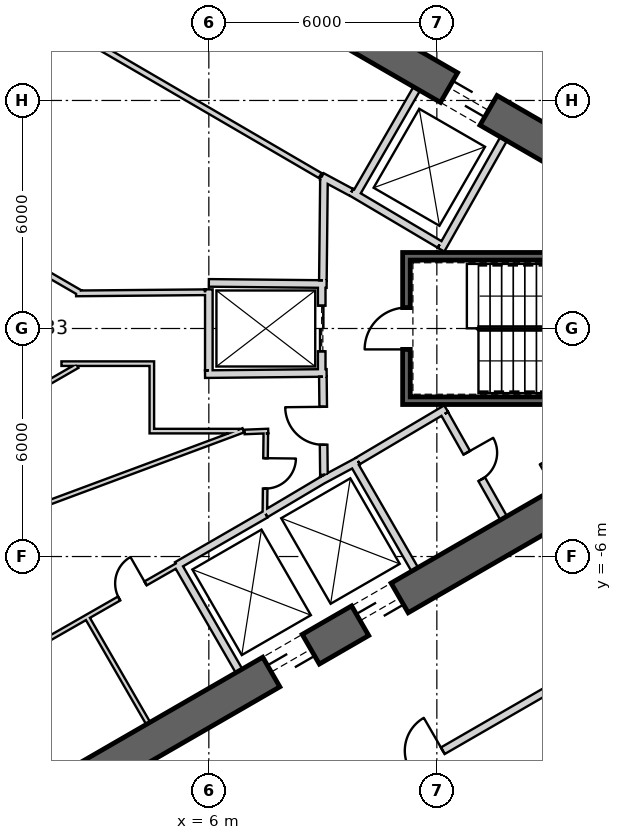
"""IFC4 building model, lengths in metres.
Left out: names, types, materials, properties, quantities, classifications, styles, units other than length and angle.
Written with IfcOpenShell. Run it as: python <this file> out.ifc"""

import sys

from ifc_helpers import new_model, si_unit, direction, frame, frame_2d, origin, place, context, subcontext, project, spatial, rectangle, extrude, element, fill, save


model = new_model("IFC4")
c1 = context("Model", 3, precision=1e-05, world=origin(), true_north=direction((0.0, 1.0)))
c2 = subcontext(c1, "Body", "Model", "MODEL_VIEW")
j1 = project(units=[si_unit("LENGTHUNIT", "METRE"), si_unit("PLANEANGLEUNIT", "RADIAN")], contexts=[c1])
p1 = place(None, origin())
s1 = spatial("IfcSite", under=j1, at=p1, CompositionType="ELEMENT")
p2 = place(p1, origin())
s2 = spatial("IfcBuilding", under=s1, at=p2, CompositionType="ELEMENT")
p3 = place(p2, frame((0.0, 0.0, 298.7)))
s3 = spatial("IfcBuildingStorey", under=s2, at=p3, CompositionType="ELEMENT", Elevation=298.7)
p4 = place(p3, frame((19.475, 2.208, 0.0), z_axis=(0.0, 0.0, 1.0), x_axis=(-0.866028369851, 0.499994862586, 0.0)))
e1 = element("IfcWall", 1, at=p4, inside=s3, PredefinedType="SHEAR", context=c2, shape_type="SweptSolid", body=[
    extrude(rectangle(XDim=31.523, YDim=0.9, at=frame_2d((15.762, 0.0))), origin(), (0.0, 0.0, 1.0), 3.9),
])
p5 = place(p4, frame((7.062, 0.0, 0.0)))
e2 = element("IfcOpeningElement", 2, at=p5, cuts=e1, PredefinedType="OPENING", context=c2, shape_type="SweptSolid", body=[
    extrude(rectangle(XDim=1.2, YDim=2.4, at=frame_2d((0.6, 1.2))), frame((0.0, 0.46, 0.0), z_axis=(0.0, -1.0, 0.0), x_axis=(1.0, 0.0, 0.0)), (0.0, 0.0, 1.0), 0.92),
])
p6 = place(p4, frame((3.612, 0.0, 0.0)))
e3 = element("IfcOpeningElement", 3, at=p6, cuts=e1, PredefinedType="OPENING", context=c2, shape_type="SweptSolid", body=[
    extrude(rectangle(XDim=1.2, YDim=2.4, at=frame_2d((0.6, 1.2))), frame((0.0, 0.46, 0.0), z_axis=(0.0, -1.0, 0.0), x_axis=(1.0, 0.0, 0.0)), (0.0, 0.0, 1.0), 0.92),
])
p7 = place(p4, frame((26.712, 0.0, 0.0)))
e4 = element("IfcOpeningElement", 4, at=p7, cuts=e1, PredefinedType="OPENING", context=c2, shape_type="SweptSolid", body=[
    extrude(rectangle(XDim=1.2, YDim=2.4, at=frame_2d((0.6, 1.2))), frame((0.0, 0.46, 0.0), z_axis=(0.0, -1.0, 0.0), x_axis=(1.0, 0.0, 0.0)), (0.0, 0.0, 1.0), 0.92),
])
p8 = place(p3, frame((-7.825, -17.97, 0.0), z_axis=(0.0, 0.0, 1.0), x_axis=(0.866028369851, 0.499994862586, 0.0)))
e5 = element("IfcWall", 5, at=p8, inside=s3, PredefinedType="SHEAR", context=c2, shape_type="SweptSolid", body=[
    extrude(rectangle(XDim=31.523, YDim=0.9, at=frame_2d((15.762, 0.0))), origin(), (0.0, 0.0, 1.0), 3.9),
])
p9 = place(p8, frame((17.862, 0.0, 0.0)))
e6 = element("IfcOpeningElement", 6, at=p9, cuts=e5, PredefinedType="OPENING", context=c2, shape_type="SweptSolid", body=[
    extrude(rectangle(XDim=1.2, YDim=2.4, at=frame_2d((0.6, 1.2))), frame((0.0, 0.46, 0.0), z_axis=(0.0, -1.0, 0.0), x_axis=(1.0, 0.0, 0.0)), (0.0, 0.0, 1.0), 0.92),
])
p10 = place(p8, frame((20.562, 0.0, 0.0)))
e7 = element("IfcOpeningElement", 7, at=p10, cuts=e5, PredefinedType="OPENING", context=c2, shape_type="SweptSolid", body=[
    extrude(rectangle(XDim=1.2, YDim=2.4, at=frame_2d((0.6, 1.2))), frame((0.0, 0.46, 0.0), z_axis=(0.0, -1.0, 0.0), x_axis=(1.0, 0.0, 0.0)), (0.0, 0.0, 1.0), 0.92),
])
p11 = place(p8, frame((26.712, 0.0, 0.0)))
e8 = element("IfcOpeningElement", 8, at=p11, cuts=e5, PredefinedType="OPENING", context=c2, shape_type="SweptSolid", body=[
    extrude(rectangle(XDim=1.2, YDim=2.4, at=frame_2d((0.6, 1.2))), frame((0.0, 0.46, 0.0), z_axis=(0.0, -1.0, 0.0), x_axis=(1.0, 0.0, 0.0)), (0.0, 0.0, 1.0), 0.92),
])
p12 = place(p8, frame((3.612, 0.0, 0.0)))
e9 = element("IfcOpeningElement", 9, at=p12, cuts=e5, PredefinedType="OPENING", context=c2, shape_type="SweptSolid", body=[
    extrude(rectangle(XDim=1.2, YDim=2.4, at=frame_2d((0.6, 1.2))), frame((0.0, 0.46, 0.0), z_axis=(0.0, -1.0, 0.0), x_axis=(1.0, 0.0, 0.0)), (0.0, 0.0, 1.0), 0.92),
])
p13 = place(p3, frame((9.847, 3.495, 0.0), z_axis=(0.0, 0.0, 1.0), x_axis=(0.499984717929, 0.866034226713, 0.0)))
e10 = element("IfcWall", 10, at=p13, inside=s3, PredefinedType="PLUMBINGWALL", context=c2, shape_type="SweptSolid", body=[
    extrude(rectangle(XDim=3.25, YDim=0.2, at=frame_2d((1.625, 0.0))), origin(), (0.0, 0.0, 1.0), 3.6),
])
p14 = place(p3, frame((12.11, 2.073, 0.0), z_axis=(0.0, 0.0, 1.0), x_axis=(0.49196600604, 0.870614408852, 0.0)))
e11 = element("IfcWall", 11, at=p14, inside=s3, PredefinedType="PLUMBINGWALL", context=c2, shape_type="SweptSolid", body=[
    extrude(rectangle(XDim=3.35, YDim=0.2, at=frame_2d((1.675, 0.0))), origin(), (0.0, 0.0, 1.0), 3.6),
])
p15 = place(p3, frame((12.073, 2.211, 0.0), z_axis=(0.0, 0.0, 1.0), x_axis=(-0.860414880418, 0.509594185166, 0.0)))
e12 = element("IfcWall", 12, at=p15, inside=s3, PredefinedType="PLUMBINGWALL", context=c2, shape_type="SweptSolid", body=[
    extrude(rectangle(XDim=2.7, YDim=0.2, at=frame_2d((1.35, 0.0))), origin(), (0.0, 0.0, 1.0), 3.6),
])
p16 = place(p3, frame((6.795, -9.01, 0.0), z_axis=(0.0, 0.0, 1.0), x_axis=(-0.499984717929, 0.866034226713, 0.0)))
e13 = element("IfcWall", 13, at=p16, inside=s3, PredefinedType="PLUMBINGWALL", context=c2, shape_type="SweptSolid", body=[
    extrude(rectangle(XDim=3.25, YDim=0.2, at=frame_2d((1.625, 0.0))), origin(), (0.0, 0.0, 1.0), 3.6),
])
p17 = place(p3, frame((5.159, -6.236, 0.0), z_axis=(0.0, 0.0, 1.0), x_axis=(0.866036505625, 0.499980770555, 0.0)))
e14 = element("IfcWall", 14, at=p17, inside=s3, PredefinedType="PLUMBINGWALL", context=c2, shape_type="SweptSolid", body=[
    extrude(rectangle(XDim=2.7, YDim=0.2, at=frame_2d((1.35, 0.0))), origin(), (0.0, 0.0, 1.0), 3.6),
])
p18 = place(p3, frame((9.795, -3.525, 0.0), z_axis=(0.0, 0.0, 1.0), x_axis=(0.499984717929, -0.866034226713, 0.0)))
e15 = element("IfcWall", 15, at=p18, inside=s3, PredefinedType="PLUMBINGWALL", context=c2, shape_type="SweptSolid", body=[
    extrude(rectangle(XDim=3.25, YDim=0.2, at=frame_2d((1.625, 0.0))), origin(), (0.0, 0.0, 1.0), 3.6),
])
p19 = place(p3, frame((8.974, -3.999, 0.0), z_axis=(0.0, 0.0, 1.0), x_axis=(0.880907015104, 0.473289373154, 0.0)))
e16 = element("IfcWall", 16, at=p19, inside=s3, PredefinedType="PLUMBINGWALL", context=c2, shape_type="SweptSolid", body=[
    extrude(rectangle(XDim=1.078, YDim=0.2, at=frame_2d((0.539, 0.0))), origin(), (0.0, 0.0, 1.0), 3.6),
])
p20 = place(p3, frame((7.493, -4.878, 0.0), z_axis=(0.0, 0.0, 1.0), x_axis=(0.859981807212, 0.510324691999, 0.0)))
e17 = element("IfcWall", 17, at=p20, inside=s3, PredefinedType="PLUMBINGWALL", context=c2, shape_type="SweptSolid", body=[
    extrude(rectangle(XDim=1.845, YDim=0.2, at=frame_2d((0.922, 0.0))), origin(), (0.0, 0.0, 1.0), 3.6),
])
p21 = place(p3, frame((19.2, 1.9, -0.3), z_axis=(0.0, 0.0, 1.0), x_axis=(-1.0, 0.0, 0.0)))
e18 = element("IfcWall", 18, at=p21, inside=s3, PredefinedType="SHEAR", context=c2, shape_type="SweptSolid", body=[
    extrude(rectangle(XDim=8.1, YDim=0.2, at=frame_2d((4.05, 0.0))), origin(), (0.0, 0.0, 1.0), 3.9),
])
p22 = place(p3, frame((11.1, -1.9, -0.3), z_axis=(0.0, 0.0, 1.0), x_axis=(1.0, 0.0, 0.0)))
e19 = element("IfcWall", 19, at=p22, inside=s3, PredefinedType="SHEAR", context=c2, shape_type="SweptSolid", body=[
    extrude(rectangle(XDim=7.9, YDim=0.2, at=frame_2d((3.95, 0.0))), origin(), (0.0, 0.0, 1.0), 3.9),
])
p23 = place(p3, frame((11.2, -1.8, -0.3), z_axis=(0.0, 0.0, 1.0), x_axis=(0.0, 1.0, 0.0)))
e20 = element("IfcWall", 20, at=p23, inside=s3, PredefinedType="SHEAR", context=c2, shape_type="SweptSolid", body=[
    extrude(rectangle(XDim=3.6, YDim=0.2, at=frame_2d((1.8, 0.0))), origin(), (0.0, 0.0, 1.0), 3.9),
])
p24 = place(p23, frame((1.25, 0.0, 0.3)))
e21 = element("IfcOpeningElement", 21, at=p24, cuts=e20, PredefinedType="OPENING", context=c2, shape_type="SweptSolid", body=[
    extrude(rectangle(XDim=1.1, YDim=2.1, at=frame_2d((0.55, 1.05))), frame((0.0, 0.11, 0.0), z_axis=(0.0, -1.0, 0.0), x_axis=(1.0, 0.0, 0.0)), (0.0, 0.0, 1.0), 0.22),
])
p25 = place(p3, frame((8.97, 1.2, 0.0), z_axis=(0.0, 0.0, 1.0), x_axis=(0.0, -1.0, 0.0)))
e22 = element("IfcWall", 22, at=p25, inside=s3, PredefinedType="PLUMBINGWALL", context=c2, shape_type="SweptSolid", body=[
    extrude(rectangle(XDim=2.4, YDim=0.2, at=frame_2d((1.2, 0.0))), origin(), (0.0, 0.0, 1.0), 3.6),
])
p26 = place(p25, frame((0.6, 0.0, 0.0)))
e23 = element("IfcOpeningElement", 23, at=p26, cuts=e22, PredefinedType="OPENING", context=c2, shape_type="SweptSolid", body=[
    extrude(rectangle(XDim=1.2, YDim=2.4, at=frame_2d((0.6, 1.2))), frame((0.0, 0.11, 0.0), z_axis=(0.0, -1.0, 0.0), x_axis=(1.0, 0.0, 0.0)), (0.0, 0.0, 1.0), 0.22),
])
p27 = place(p3, frame((6.0, 1.2, 0.0), z_axis=(0.0, 0.0, 1.0), x_axis=(0.999949988, -0.010001074852, 0.0)))
e24 = element("IfcWall", 24, at=p27, inside=s3, PredefinedType="PLUMBINGWALL", context=c2, shape_type="SweptSolid", body=[
    extrude(rectangle(XDim=3.1, YDim=0.2, at=frame_2d((1.55, 0.0))), origin(), (0.0, 0.0, 1.0), 3.6),
])
p28 = place(p3, frame((5.9, -1.201, 0.0), z_axis=(0.0, 0.0, 1.0), x_axis=(0.999950064753, 0.009993397809, 0.0)))
e25 = element("IfcWall", 25, at=p28, inside=s3, PredefinedType="PLUMBINGWALL", context=c2, shape_type="SweptSolid", body=[
    extrude(rectangle(XDim=3.2, YDim=0.2, at=frame_2d((1.6, 0.0))), origin(), (0.0, 0.0, 1.0), 3.6),
])
p29 = place(p3, frame((6.0, -1.1, 0.0), z_axis=(0.0, 0.0, 1.0), x_axis=(0.0, 1.0, 0.0)))
e26 = element("IfcWall", 26, at=p29, inside=s3, PredefinedType="PLUMBINGWALL", context=c2, shape_type="SweptSolid", body=[
    extrude(rectangle(XDim=2.13, YDim=0.2, at=frame_2d((1.065, 0.0))), origin(), (0.0, 0.0, 1.0), 3.6),
])
p30 = place(p3, frame((8.974, 3.999, 0.0), z_axis=(0.0, 0.0, 1.0), x_axis=(0.880917147855, -0.473270513147, 0.0)))
e27 = element("IfcWall", 27, at=p30, inside=s3, PredefinedType="PARTITIONING", context=c2, shape_type="SweptSolid", body=[
    extrude(rectangle(XDim=0.878, YDim=0.2, at=frame_2d((0.439, 0.0))), origin(), (0.0, 0.0, 1.0), 3.6),
])
p31 = place(p3, frame((8.931, 4.024, 0.0), z_axis=(0.0, 0.0, 1.0), x_axis=(-0.863936620311, 0.50360055211, 0.0)))
e28 = element("IfcWall", 28, at=p31, inside=s3, PredefinedType="PLUMBINGWALL", context=c2, shape_type="SweptSolid", body=[
    extrude(rectangle(XDim=7.072, YDim=0.15, at=frame_2d((3.536, 0.0))), origin(), (0.0, 0.0, 1.0), 3.6),
])
p32 = place(p3, frame((4.405, -10.389, 0.0), z_axis=(0.0, 0.0, 1.0), x_axis=(-0.500017246033, 0.866015446554, 0.0)))
e29 = element("IfcWall", 29, at=p32, inside=s3, PredefinedType="PARTITIONING", context=c2, shape_type="SweptSolid", body=[
    extrude(rectangle(XDim=3.25, YDim=0.12, at=frame_2d((1.625, 0.0))), origin(), (0.0, 0.0, 1.0), 3.6),
])
p33 = place(p3, frame((-1.024, -9.771, 0.0), z_axis=(0.0, 0.0, 1.0), x_axis=(0.868110220015, 0.496371479746, 0.0)))
e30 = element("IfcWall", 30, at=p33, inside=s3, PredefinedType="PARTITIONING", context=c2, shape_type="SweptSolid", body=[
    extrude(rectangle(XDim=7.123, YDim=0.12, at=frame_2d((3.561, 0.0))), origin(), (0.0, 0.0, 1.0), 3.6),
])
p34 = place(p33, frame((5.373, 0.0, 0.0)))
e31 = element("IfcOpeningElement", 31, at=p34, cuts=e30, PredefinedType="OPENING", context=c2, shape_type="SweptSolid", body=[
    extrude(rectangle(XDim=0.8, YDim=2.1, at=frame_2d((0.4, 1.05))), frame((0.0, 0.07, 0.0), z_axis=(0.0, -1.0, 0.0), x_axis=(1.0, 0.0, 0.0)), (0.0, 0.0, 1.0), 0.14),
])
p35 = place(p3, frame((12.245, -2.109, 0.0), z_axis=(0.0, 0.0, 1.0), x_axis=(-0.860414880418, -0.509594185166, 0.0)))
e32 = element("IfcWall", 32, at=p35, inside=s3, PredefinedType="PARTITIONING", context=c2, shape_type="SweptSolid", body=[
    extrude(rectangle(XDim=2.7, YDim=0.2, at=frame_2d((1.35, 0.0))), origin(), (0.0, 0.0, 1.0), 3.6),
])
p36 = place(p3, frame((13.758, -4.99, 0.0), z_axis=(0.0, 0.0, 1.0), x_axis=(-0.491993409184, 0.87059892334, 0.0)))
e33 = element("IfcWall", 33, at=p36, inside=s3, PredefinedType="PARTITIONING", context=c2, shape_type="SweptSolid", body=[
    extrude(rectangle(XDim=3.15, YDim=0.2, at=frame_2d((1.575, 0.0))), origin(), (0.0, 0.0, 1.0), 3.6),
])
p37 = place(p36, frame((1.175, 0.0, 0.0)))
e34 = element("IfcOpeningElement", 34, at=p37, cuts=e33, PredefinedType="OPENING", context=c2, shape_type="SweptSolid", body=[
    extrude(rectangle(XDim=0.8, YDim=2.1, at=frame_2d((0.4, 1.05))), frame((0.0, 0.11, 0.0), z_axis=(0.0, -1.0, 0.0), x_axis=(1.0, 0.0, 0.0)), (0.0, 0.0, 1.0), 0.22),
])
p38 = place(p3, frame((9.001, 1.27, 0.0), z_axis=(0.0, 0.0, 1.0), x_axis=(0.010747252091, 0.999942246619, 0.0)))
e35 = element("IfcWall", 35, at=p38, inside=s3, PredefinedType="PARTITIONING", context=c2, shape_type="SweptSolid", body=[
    extrude(rectangle(XDim=2.726, YDim=0.2, at=frame_2d((1.363, 0.0))), origin(), (0.0, 0.0, 1.0), 3.6),
])
p39 = place(p3, frame((9.029, -3.851, 0.0), z_axis=(0.0, 0.0, 1.0), x_axis=(-0.010783593937, 0.99994185536, 0.0)))
e36 = element("IfcWall", 36, at=p39, inside=s3, PredefinedType="PARTITIONING", context=c2, shape_type="SweptSolid", body=[
    extrude(rectangle(XDim=2.581, YDim=0.2, at=frame_2d((1.291, 0.0))), origin(), (0.0, 0.0, 1.0), 3.6),
])
p40 = place(p39, frame((0.791, 0.0, 0.0)))
e37 = element("IfcOpeningElement", 37, at=p40, cuts=e36, PredefinedType="OPENING", context=c2, shape_type="SweptSolid", body=[
    extrude(rectangle(XDim=1.0, YDim=2.1, at=frame_2d((0.5, 1.05))), frame((0.0, 0.11, 0.0), z_axis=(0.0, -1.0, 0.0), x_axis=(1.0, 0.0, 0.0)), (0.0, 0.0, 1.0), 0.22),
])
p41 = place(p3, frame((2.507, 0.924, 0.0), z_axis=(0.0, 0.0, 1.0), x_axis=(0.999961473465, 0.008777903278, 0.0)))
e38 = element("IfcWall", 38, at=p41, inside=s3, PredefinedType="PLUMBINGWALL", context=c2, shape_type="SweptSolid", body=[
    extrude(rectangle(XDim=3.393, YDim=0.15, at=frame_2d((1.697, 0.0))), origin(), (0.0, 0.0, 1.0), 3.6),
])
p42 = place(p3, frame((-0.385, 2.673, 0.0), z_axis=(0.0, 0.0, 1.0), x_axis=(0.865415028875, -0.501055713266, 0.0)))
e39 = element("IfcWall", 39, at=p42, inside=s3, PredefinedType="PLUMBINGWALL", context=c2, shape_type="SweptSolid", body=[
    extrude(rectangle(XDim=3.465, YDim=0.15, at=frame_2d((1.732, 0.0))), origin(), (0.0, 0.0, 1.0), 3.6),
])
p43 = place(p3, frame((6.905, -2.679, 0.0), z_axis=(0.0, 0.0, 1.0), x_axis=(-0.937260745886, -0.348629164331, 0.0)))
e40 = element("IfcWall", 40, at=p43, inside=s3, PredefinedType="PARTITIONING", context=c2, shape_type="SweptSolid", body=[
    extrude(rectangle(XDim=9.541, YDim=0.12, at=frame_2d((4.771, 0.0))), origin(), (0.0, 0.0, 1.0), 3.6),
])
p44 = place(p3, frame((2.539, -0.985, 0.0), z_axis=(0.0, 0.0, 1.0), x_axis=(-0.866657135765, -0.498904208268, 0.0)))
e41 = element("IfcWall", 41, at=p44, inside=s3, PredefinedType="PARTITIONING", context=c2, shape_type="SweptSolid", body=[
    extrude(rectangle(XDim=3.505, YDim=0.12, at=frame_2d((1.752, 0.0))), origin(), (0.0, 0.0, 1.0), 3.6),
])
p45 = place(p3, frame((4.56, -0.925, 0.0), z_axis=(0.0, 0.0, 1.0), x_axis=(-1.0, 0.0, 0.0)))
e42 = element("IfcWall", 42, at=p45, inside=s3, PredefinedType="PARTITIONING", context=c2, shape_type="SweptSolid", body=[
    extrude(rectangle(XDim=2.438, YDim=0.12, at=frame_2d((1.219, 0.0))), origin(), (0.0, 0.0, 1.0), 3.6),
])
p46 = place(p3, frame((4.5, -2.76, 0.0), z_axis=(0.0, 0.0, 1.0), x_axis=(0.0, 1.0, 0.0)))
e43 = element("IfcWall", 43, at=p46, inside=s3, PredefinedType="PARTITIONING", context=c2, shape_type="SweptSolid", body=[
    extrude(rectangle(XDim=1.775, YDim=0.12, at=frame_2d((0.887, 0.0))), origin(), (0.0, 0.0, 1.0), 3.6),
])
p47 = place(p3, frame((6.789, -2.7, 0.0), z_axis=(0.0, 0.0, 1.0), x_axis=(-1.0, 0.0, 0.0)))
e44 = element("IfcWall", 44, at=p47, inside=s3, PredefinedType="PARTITIONING", context=c2, shape_type="SweptSolid", body=[
    extrude(rectangle(XDim=2.229, YDim=0.12, at=frame_2d((1.115, 0.0))), origin(), (0.0, 0.0, 1.0), 3.6),
])
p48 = place(p3, frame((7.563, -2.698, 0.0), z_axis=(0.0, 0.0, 1.0), x_axis=(-0.999184595054, -0.040375054253, 0.0)))
e45 = element("IfcWall", 45, at=p48, inside=s3, PredefinedType="PARTITIONING", context=c2, shape_type="SweptSolid", body=[
    extrude(rectangle(XDim=0.623, YDim=0.12, at=frame_2d((0.312, 0.0))), origin(), (0.0, 0.0, 1.0), 3.6),
])
p49 = place(p3, frame((7.475, -4.865, 0.0), z_axis=(0.0, 0.0, 1.0), x_axis=(0.011716133148, 0.999931363757, 0.0)))
e46 = element("IfcWall", 46, at=p49, inside=s3, PredefinedType="PARTITIONING", context=c2, shape_type="SweptSolid", body=[
    extrude(rectangle(XDim=2.105, YDim=0.12, at=frame_2d((1.052, 0.0))), origin(), (0.0, 0.0, 1.0), 3.6),
])
p50 = place(p49, frame((0.652, 0.0, 0.0)))
e47 = element("IfcOpeningElement", 47, at=p50, cuts=e46, PredefinedType="OPENING", context=c2, shape_type="SweptSolid", body=[
    extrude(rectangle(XDim=0.8, YDim=2.1, at=frame_2d((0.4, 1.05))), frame((0.0, 0.07, 0.0), z_axis=(0.0, -1.0, 0.0), x_axis=(1.0, 0.0, 0.0)), (0.0, 0.0, 1.0), 0.14),
])
p51 = place(p3, frame((1.415, -17.312, 0.0), z_axis=(0.0, 0.0, 1.0), x_axis=(0.866022488339, 0.500005049665, 0.0)))
e48 = element("IfcWall", 48, at=p51, inside=s3, PredefinedType="PARTITIONING", context=c2, shape_type="SweptSolid", body=[
    extrude(rectangle(XDim=23.806, YDim=0.2, at=frame_2d((11.903, 0.0))), origin(), (0.0, 0.0, 1.0), 2.88),
])
p52 = place(p51, frame((11.403, 0.0, 0.0)))
e49 = element("IfcOpeningElement", 49, at=p52, cuts=e48, PredefinedType="OPENING", context=c2, shape_type="SweptSolid", body=[
    extrude(rectangle(XDim=1.0, YDim=2.1, at=frame_2d((0.5, 1.05))), frame((0.0, 0.11, 0.0), z_axis=(0.0, -1.0, 0.0), x_axis=(1.0, 0.0, 0.0)), (0.0, 0.0, 1.0), 0.22),
])
p53 = place(p24, origin())
e50 = element("IfcDoor", 50, at=p53, inside=s3, OperationType="SINGLE_SWING_RIGHT", PredefinedType="USERDEFINED", context=c2, shape_type="SweptSolid", body=[
    extrude(rectangle(XDim=1.1, YDim=2.1, at=frame_2d((0.55, 1.05))), frame((0.0, 0.025, 0.0), z_axis=(0.0, -1.0, 0.0), x_axis=(1.0, 0.0, 0.0)), (0.0, 0.0, 1.0), 0.05),
])
fill(e21, e50)
p54 = place(p40, origin())
e51 = element("IfcDoor", 51, at=p54, inside=s3, OperationType="SINGLE_SWING_RIGHT", PredefinedType="USERDEFINED", context=c2, shape_type="SweptSolid", body=[
    extrude(rectangle(XDim=1.0, YDim=2.1, at=frame_2d((0.5, 1.05))), frame((0.0, 0.025, 0.0), z_axis=(0.0, -1.0, 0.0), x_axis=(1.0, 0.0, 0.0)), (0.0, 0.0, 1.0), 0.05),
])
fill(e37, e51)
p55 = place(p26, origin())
e52 = element("IfcDoor", 52, at=p55, inside=s3, OperationType="SLIDING_TO_LEFT", PredefinedType="USERDEFINED", context=c2, shape_type="SweptSolid", body=[
    extrude(rectangle(XDim=1.2, YDim=2.4, at=frame_2d((0.6, 1.2))), frame((0.0, 0.025, 0.0), z_axis=(0.0, -1.0, 0.0), x_axis=(1.0, 0.0, 0.0)), (0.0, 0.0, 1.0), 0.05),
])
fill(e23, e52)
p56 = place(p50, origin())
e53 = element("IfcDoor", 53, at=p56, inside=s3, OperationType="SINGLE_SWING_LEFT", PredefinedType="USERDEFINED", context=c2, shape_type="SweptSolid", body=[
    extrude(rectangle(XDim=0.8, YDim=2.1, at=frame_2d((0.4, 1.05))), frame((0.0, 0.025, 0.0), z_axis=(0.0, -1.0, 0.0), x_axis=(1.0, 0.0, 0.0)), (0.0, 0.0, 1.0), 0.05),
])
fill(e47, e53)
p57 = place(p34, origin())
e54 = element("IfcDoor", 54, at=p57, inside=s3, OperationType="SINGLE_SWING_RIGHT", PredefinedType="USERDEFINED", context=c2, shape_type="SweptSolid", body=[
    extrude(rectangle(XDim=0.8, YDim=2.1, at=frame_2d((0.4, 1.05))), frame((0.0, 0.025, 0.0), z_axis=(0.0, -1.0, 0.0), x_axis=(1.0, 0.0, 0.0)), (0.0, 0.0, 1.0), 0.05),
])
fill(e31, e54)
p58 = place(p37, origin())
e55 = element("IfcDoor", 55, at=p58, inside=s3, OperationType="SINGLE_SWING_RIGHT", PredefinedType="USERDEFINED", context=c2, shape_type="SweptSolid", body=[
    extrude(rectangle(XDim=0.8, YDim=2.1, at=frame_2d((0.4, 1.05))), frame((0.0, 0.025, 0.0), z_axis=(0.0, -1.0, 0.0), x_axis=(1.0, 0.0, 0.0)), (0.0, 0.0, 1.0), 0.05),
])
fill(e34, e55)
p59 = place(p52, origin())
e56 = element("IfcDoor", 56, at=p59, inside=s3, OperationType="SINGLE_SWING_LEFT", PredefinedType="USERDEFINED", context=c2, shape_type="SweptSolid", body=[
    extrude(rectangle(XDim=1.0, YDim=2.1, at=frame_2d((0.5, 1.05))), frame((0.0, 0.025, 0.0), z_axis=(0.0, -1.0, 0.0), x_axis=(1.0, 0.0, 0.0)), (0.0, 0.0, 1.0), 0.05),
])
fill(e49, e56)
p60 = place(p5, origin())
e57 = element("IfcDoor", 57, at=p60, inside=s3, OperationType="SLIDING_TO_LEFT", PredefinedType="USERDEFINED", context=c2, shape_type="SweptSolid", body=[
    extrude(rectangle(XDim=1.2, YDim=2.4, at=frame_2d((0.6, 1.2))), frame((0.0, 0.025, 0.0), z_axis=(0.0, -1.0, 0.0), x_axis=(1.0, 0.0, 0.0)), (0.0, 0.0, 1.0), 0.05),
])
fill(e2, e57)
p61 = place(p9, origin())
e58 = element("IfcDoor", 58, at=p61, inside=s3, OperationType="SLIDING_TO_LEFT", PredefinedType="USERDEFINED", context=c2, shape_type="SweptSolid", body=[
    extrude(rectangle(XDim=1.2, YDim=2.4, at=frame_2d((0.6, 1.2))), frame((0.0, 0.025, 0.0), z_axis=(0.0, -1.0, 0.0), x_axis=(1.0, 0.0, 0.0)), (0.0, 0.0, 1.0), 0.05),
])
fill(e6, e58)
p62 = place(p10, origin())
e59 = element("IfcDoor", 59, at=p62, inside=s3, OperationType="SLIDING_TO_LEFT", PredefinedType="USERDEFINED", context=c2, shape_type="SweptSolid", body=[
    extrude(rectangle(XDim=1.2, YDim=2.4, at=frame_2d((0.6, 1.2))), frame((0.0, 0.025, 0.0), z_axis=(0.0, -1.0, 0.0), x_axis=(1.0, 0.0, 0.0)), (0.0, 0.0, 1.0), 0.05),
])
fill(e7, e59)
save(model, sys.argv[1])
